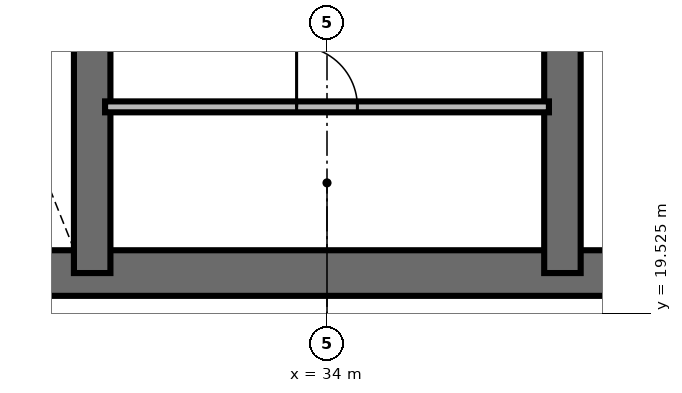
"""IFC4 building model, lengths in metres.
Left out: names, types, materials, properties, quantities, classifications, styles, units other than length and angle.
Written with IfcOpenShell. Run it as: python <this file> out.ifc"""

import sys

from ifc_helpers import new_model, si_unit, direction, frame, frame_2d, origin, place, context, subcontext, project, spatial, rectangle, extrude, element, fill, save


model = new_model("IFC4")
c1 = context("Model", 3, precision=1e-05, world=origin(), true_north=direction((0.0, 1.0)))
c2 = subcontext(c1, "Body", "Model", "MODEL_VIEW")
j1 = project(units=[si_unit("LENGTHUNIT", "METRE"), si_unit("PLANEANGLEUNIT", "RADIAN")], contexts=[c1])
p1 = place(None, origin())
s1 = spatial("IfcSite", under=j1, at=p1, CompositionType="ELEMENT")
p2 = place(p1, origin())
s2 = spatial("IfcBuilding", under=s1, at=p2, CompositionType="ELEMENT")
p3 = place(p2, frame((0.0, 0.0, 209.6)))
s3 = spatial("IfcBuildingStorey", under=s2, at=p3, CompositionType="ELEMENT", Elevation=209.6)
p4 = place(p3, frame((26.072, 20.187, 0.0), z_axis=(0.0, 0.0, 1.0), x_axis=(1.0, 0.0, 0.0)))
e1 = element("IfcWall", 1, at=p4, inside=s3, PredefinedType="SHEAR", context=c2, shape_type="SweptSolid", body=[
    extrude(rectangle(XDim=15.866, YDim=0.75, at=frame_2d((7.933, 0.0))), origin(), (0.0, 0.0, 1.0), 3.6),
])
for number, where, z_axis, x_axis in (
    (2, (30.138, 20.187, 0.0), (0.0, 0.0, 1.0), (0.0, 1.0, 0.0)),
    (3, (37.872, 20.187, 0.0), (0.0, 0.0, 1.0), (0.0, 1.0, 0.0)),
):
    element("IfcWall", number, at=place(p3, frame(where, z_axis=z_axis, x_axis=x_axis)), inside=s3, PredefinedType="SHEAR", context=c2, shape_type="SweptSolid", body=[
        extrude(rectangle(XDim=9.826, YDim=0.6, at=frame_2d((4.913, 0.0))), origin(), (0.0, 0.0, 1.0), 3.6),
    ])
p5 = place(p3, frame((30.35, 22.92, 0.0), z_axis=(0.0, 0.0, 1.0), x_axis=(1.0, 0.0, 0.0)))
e4 = element("IfcWall", 4, at=p5, inside=s3, PredefinedType="PARTITIONING", context=c2, shape_type="SweptSolid", body=[
    extrude(rectangle(XDim=7.3, YDim=0.18, at=frame_2d((3.65, 0.0))), origin(), (0.0, 0.0, 1.0), 2.46),
])
p6 = place(p5, frame((3.15, 0.0, 0.0)))
e5 = element("IfcOpeningElement", 5, at=p6, cuts=e4, PredefinedType="OPENING", context=c2, shape_type="SweptSolid", body=[
    extrude(rectangle(XDim=1.0, YDim=2.15, at=frame_2d((0.5, 1.075))), frame((0.0, 0.1, 0.0), z_axis=(0.0, -1.0, 0.0), x_axis=(1.0, 0.0, 0.0)), (0.0, 0.0, 1.0), 0.2),
])
p7 = place(p6, origin())
e6 = element("IfcDoor", 6, at=p7, inside=s3, OperationType="SINGLE_SWING_LEFT", PredefinedType="DOOR", context=c2, shape_type="SweptSolid", body=[
    extrude(rectangle(XDim=1.0, YDim=2.15, at=frame_2d((0.5, 1.075))), frame((0.0, 0.025, 0.0), z_axis=(0.0, -1.0, 0.0), x_axis=(1.0, 0.0, 0.0)), (0.0, 0.0, 1.0), 0.05),
])
fill(e5, e6)
save(model, sys.argv[1])
